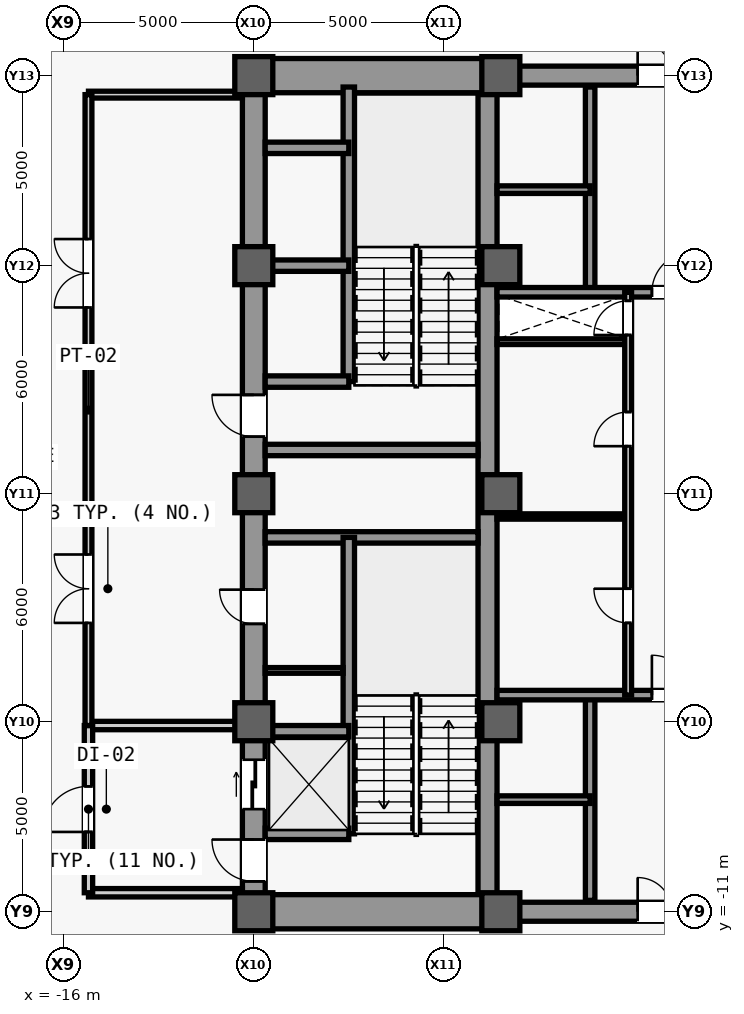
"""IFC4 building model, lengths in metres.
Left out: names, types, materials, properties, quantities, classifications, styles, units other than length and angle.
Written with IfcOpenShell. Run it as: python <this file> out.ifc"""

import sys

from ifc_helpers import new_model, si_unit, direction, frame, frame_2d, origin, origin_2d, place, context, subcontext, project, spatial, rectangle, extrude, source, transform, mapped, element, fill, save


model = new_model("IFC4")
c1 = context("Model", 3, precision=1e-05, world=origin(), true_north=direction((0.0, 1.0)))
c2 = subcontext(c1, "Body", "Model", "MODEL_VIEW")
j1 = project(units=[si_unit("LENGTHUNIT", "METRE"), si_unit("PLANEANGLEUNIT", "RADIAN")], contexts=[c1])
p1 = place(None, origin())
s1 = spatial("IfcSite", under=j1, at=p1, CompositionType="ELEMENT")
p2 = place(p1, origin())
s2 = spatial("IfcBuilding", under=s1, at=p2, CompositionType="ELEMENT")
p3 = place(p2, frame((0.0, 0.0, -4.8)))
s3 = spatial("IfcBuildingStorey", under=s2, at=p3, CompositionType="ELEMENT", Elevation=-4.8)
m1 = source(origin(), c2, "Body", "SweptSolid", [
    extrude(rectangle(XDim=22.0, YDim=0.6, at=frame_2d((11.0, 0.0))), origin(), (0.0, 0.0, 1.0), 4.48),
])
p4 = place(p3, frame((-11.0, -11.0, 0.0), z_axis=(0.0, 0.0, 1.0), x_axis=(0.0, 1.0, 0.0)))
e1 = element("IfcWall", 1, at=p4, inside=s3, PredefinedType="SHEAR", context=c2, shape_type="MappedRepresentation", body=[
    mapped(m1, transform((0.0, 0.0, 0.0), scale=1.0)),
])
m2 = source(origin(), c2, "Body", "SweptSolid", [
    extrude(rectangle(XDim=1.1, YDim=2.2, at=frame_2d((0.55, 1.1))), frame((0.0, 0.31, 0.0), z_axis=(0.0, -1.0, 0.0), x_axis=(1.0, 0.0, 0.0)), (0.0, 0.0, 1.0), 0.62),
])
p5 = place(p4, frame((0.8, 0.0, 0.0)))
e2 = element("IfcOpeningElement", 2, at=p5, cuts=e1, PredefinedType="OPENING", context=c2, shape_type="MappedRepresentation", body=[
    mapped(m2, transform((0.0, 0.0, 0.0), scale=1.0)),
])
p6 = place(p4, frame((12.5, 0.0, 0.0)))
e3 = element("IfcOpeningElement", 3, at=p6, cuts=e1, PredefinedType="OPENING", context=c2, shape_type="MappedRepresentation", body=[
    mapped(m2, transform((0.0, 0.0, 0.0), scale=1.0)),
])
m3 = source(origin(), c2, "Body", "SweptSolid", [
    extrude(rectangle(XDim=0.9, YDim=2.15, at=frame_2d((0.45, 1.075))), frame((0.0, 0.31, 0.0), z_axis=(0.0, -1.0, 0.0), x_axis=(1.0, 0.0, 0.0)), (0.0, 0.0, 1.0), 0.62),
])
p7 = place(p4, frame((7.575, 0.0, 0.0)))
e4 = element("IfcOpeningElement", 4, at=p7, cuts=e1, PredefinedType="OPENING", context=c2, shape_type="MappedRepresentation", body=[
    mapped(m3, transform((0.0, 0.0, 0.0), scale=1.0)),
])
m4 = source(origin(), c2, "Body", "SweptSolid", [
    extrude(rectangle(XDim=1.3, YDim=2.3, at=frame_2d((0.65, 1.15))), frame((0.0, 0.31, 0.0), z_axis=(0.0, -1.0, 0.0), x_axis=(1.0, 0.0, 0.0)), (0.0, 0.0, 1.0), 0.62),
])
p8 = place(p4, frame((2.7, 0.0, 0.0)))
e5 = element("IfcOpeningElement", 5, at=p8, cuts=e1, PredefinedType="OPENING", context=c2, shape_type="MappedRepresentation", body=[
    mapped(m4, transform((0.0, 0.0, 0.0), scale=1.0)),
])
m5 = source(origin(), c2, "Body", "SweptSolid", [
    extrude(rectangle(XDim=21.4, YDim=0.5, at=frame_2d((10.7, 0.0))), origin(), (0.0, 0.0, 1.0), 4.48),
])
p9 = place(p3, frame((-4.85, -10.7, 0.0), z_axis=(0.0, 0.0, 1.0), x_axis=(0.0, 1.0, 0.0)))
e6 = element("IfcWall", 6, at=p9, inside=s3, PredefinedType="SHEAR", context=c2, shape_type="MappedRepresentation", body=[
    mapped(m5, transform((0.0, 0.0, 0.0), scale=1.0)),
])
m6 = source(origin(), c2, "Body", "SweptSolid", [
    extrude(rectangle(XDim=5.85, YDim=0.9, at=frame_2d((2.925, 0.0))), origin(), (0.0, 0.0, 1.0), 4.48),
])
for number, where, z_axis, x_axis in (
    (7, (-10.7, -11.0, 0.0), (0.0, 0.0, 1.0), (1.0, 0.0, 0.0)),
    (8, (-10.7, 11.0, 0.0), (0.0, 0.0, 1.0), (1.0, 0.0, 0.0)),
):
    element("IfcWall", number, at=place(p3, frame(where, z_axis=z_axis, x_axis=x_axis)), inside=s3, PredefinedType="SHEAR", context=c2, shape_type="MappedRepresentation", body=[
        mapped(m6, transform((0.0, 0.0, 0.0), scale=1.0)),
    ])
m7 = source(origin(), c2, "Body", "SweptSolid", [
    extrude(rectangle(XDim=5.6, YDim=0.3, at=frame_2d((2.8, 0.0))), origin(), (0.0, 0.0, 1.0), 4.48),
])
for number, where, z_axis, x_axis in (
    (9, (-10.7, -1.15, 0.0), (0.0, 0.0, 1.0), (1.0, 0.0, 0.0)),
    (10, (-10.7, 1.15, 0.0), (0.0, 0.0, 1.0), (1.0, 0.0, 0.0)),
):
    element("IfcWall", number, at=place(p3, frame(where, z_axis=z_axis, x_axis=x_axis)), inside=s3, PredefinedType="SHEAR", context=c2, shape_type="MappedRepresentation", body=[
        mapped(m7, transform((0.0, 0.0, 0.0), scale=1.0)),
    ])
m8 = source(origin(), c2, "Body", "SweptSolid", [
    extrude(rectangle(XDim=9.2, YDim=0.5, at=frame_2d((4.6, 0.0))), origin(), (0.0, 0.0, 1.0), 4.48),
])
p10 = place(p3, frame((-4.6, -11.0, 0.0), z_axis=(0.0, 0.0, 1.0), x_axis=(1.0, 0.0, 0.0)))
e11 = element("IfcWall", 11, at=p10, inside=s3, PredefinedType="SHEAR", context=c2, shape_type="MappedRepresentation", body=[
    mapped(m8, transform((0.0, 0.0, 0.0), scale=1.0)),
])
m9 = source(origin(), c2, "Body", "SweptSolid", [
    extrude(rectangle(XDim=1.8, YDim=2.25, at=frame_2d((0.9, 1.125))), frame((0.0, 0.26, 0.0), z_axis=(0.0, -1.0, 0.0), x_axis=(1.0, 0.0, 0.0)), (0.0, 0.0, 1.0), 0.52),
])
p11 = place(p10, frame((3.7, 0.0, 0.0)))
e12 = element("IfcOpeningElement", 12, at=p11, cuts=e11, PredefinedType="OPENING", context=c2, shape_type="MappedRepresentation", body=[
    mapped(m9, transform((0.0, 0.0, 0.0), scale=1.0)),
])
p12 = place(p3, frame((-4.6, 11.0, 0.0), z_axis=(0.0, 0.0, 1.0), x_axis=(1.0, 0.0, 0.0)))
e13 = element("IfcWall", 13, at=p12, inside=s3, PredefinedType="SHEAR", context=c2, shape_type="MappedRepresentation", body=[
    mapped(m8, transform((0.0, 0.0, 0.0), scale=1.0)),
])
p13 = place(p12, frame((3.7, 0.0, 0.0)))
e14 = element("IfcOpeningElement", 14, at=p13, cuts=e13, PredefinedType="OPENING", context=c2, shape_type="MappedRepresentation", body=[
    mapped(m9, transform((0.0, 0.0, 0.0), scale=1.0)),
])
m10 = source(origin(), c2, "Body", "SweptSolid", [
    extrude(rectangle(XDim=1.0, YDim=1.0, at=origin_2d()), origin(), (0.0, 0.0, 1.0), 4.8),
])
for number, where, z_axis, x_axis in (
    (15, (-11.0, -11.0, 0.0), (0.0, 0.0, 1.0), (1.0, 0.0, 0.0)),
    (16, (-11.0, -6.0, 0.0), (0.0, 0.0, 1.0), (1.0, 0.0, 0.0)),
    (17, (-11.0, 0.0, 0.0), (0.0, 0.0, 1.0), (1.0, 0.0, 0.0)),
    (18, (-11.0, 6.0, 0.0), (0.0, 0.0, 1.0), (1.0, 0.0, 0.0)),
    (19, (-11.0, 11.0, 0.0), (0.0, 0.0, 1.0), (1.0, 0.0, 0.0)),
    (20, (-4.5, -11.0, 0.0), (0.0, 0.0, 1.0), (1.0, 0.0, 0.0)),
    (21, (-4.5, -6.0, 0.0), (0.0, 0.0, 1.0), (1.0, 0.0, 0.0)),
    (22, (-4.5, 0.0, 0.0), (0.0, 0.0, 1.0), (1.0, 0.0, 0.0)),
    (23, (-4.5, 6.0, 0.0), (0.0, 0.0, 1.0), (1.0, 0.0, 0.0)),
    (24, (-4.5, 11.0, 0.0), (0.0, 0.0, 1.0), (1.0, 0.0, 0.0)),
):
    element("IfcColumn", number, at=place(p3, frame(where, z_axis=z_axis, x_axis=x_axis)), inside=s3, PredefinedType="COLUMN", context=c2, shape_type="MappedRepresentation", body=[
        mapped(m10, transform((0.0, 0.0, 0.0), scale=1.0)),
    ])
m11 = source(origin(), c2, "Body", "SweptSolid", [
    extrude(rectangle(XDim=7.8, YDim=0.3, at=frame_2d((3.9, 0.0))), origin(), (0.0, 0.0, 1.0), 4.48),
])
p14 = place(p3, frame((-8.5, -8.95, 0.0), z_axis=(0.0, 0.0, 1.0), x_axis=(0.0, 1.0, 0.0)))
e25 = element("IfcWall", 25, at=p14, inside=s3, PredefinedType="SHEAR", context=c2, shape_type="MappedRepresentation", body=[
    mapped(m11, transform((0.0, 0.0, 0.0), scale=1.0)),
])
m12 = source(origin(), c2, "Body", "SweptSolid", [
    extrude(rectangle(XDim=2.2, YDim=0.3, at=frame_2d((1.1, 0.0))), origin(), (0.0, 0.0, 1.0), 4.48),
])
for number, where, z_axis, x_axis in (
    (26, (-10.7, -8.95, 0.0), (0.0, 0.0, 1.0), (1.0, 0.0, 0.0)),
    (27, (-10.7, -6.25, 0.0), (0.0, 0.0, 1.0), (1.0, 0.0, 0.0)),
):
    element("IfcWall", number, at=place(p3, frame(where, z_axis=z_axis, x_axis=x_axis)), inside=s3, PredefinedType="SHEAR", context=c2, shape_type="MappedRepresentation", body=[
        mapped(m12, transform((0.0, 0.0, 0.0), scale=1.0)),
    ])
m13 = source(origin(), c2, "Body", "SweptSolid", [
    extrude(rectangle(XDim=7.75, YDim=0.3, at=frame_2d((3.875, 0.0))), origin(), (0.0, 0.0, 1.0), 4.48),
])
p15 = place(p3, frame((-8.5, 2.95, 0.0), z_axis=(0.0, 0.0, 1.0), x_axis=(0.0, 1.0, 0.0)))
e28 = element("IfcWall", 28, at=p15, inside=s3, PredefinedType="SHEAR", context=c2, shape_type="MappedRepresentation", body=[
    mapped(m13, transform((0.0, 0.0, 0.0), scale=1.0)),
])
for number, where, z_axis, x_axis in (
    (29, (-10.7, 2.95, 0.0), (0.0, 0.0, 1.0), (1.0, 0.0, 0.0)),
    (30, (-10.7, 6.0, 0.0), (0.0, 0.0, 1.0), (1.0, 0.0, 0.0)),
    (31, (-10.7, 9.1, 0.0), (0.0, 0.0, 1.0), (1.0, 0.0, 0.0)),
):
    element("IfcWall", number, at=place(p3, frame(where, z_axis=z_axis, x_axis=x_axis)), inside=s3, PredefinedType="SHEAR", context=c2, shape_type="MappedRepresentation", body=[
        mapped(m12, transform((0.0, 0.0, 0.0), scale=1.0)),
    ])
m14 = source(origin(), c2, "Body", "SweptSolid", [
    extrude(rectangle(XDim=2.05, YDim=0.15, at=frame_2d((1.025, 0.0))), origin(), (0.0, 0.0, 1.0), 4.48),
])
p16 = place(p3, frame((-10.7, -4.65, 0.0), z_axis=(0.0, 0.0, 1.0), x_axis=(1.0, 0.0, 0.0)))
e32 = element("IfcWall", 32, at=p16, inside=s3, PredefinedType="PARTITIONING", context=c2, shape_type="MappedRepresentation", body=[
    mapped(m14, transform((0.0, 0.0, 0.0), scale=1.0)),
])
m15 = source(origin(), c2, "Body", "SweptSolid", [
    extrude(rectangle(XDim=4.05, YDim=0.22, at=frame_2d((2.025, 0.0))), origin(), (0.0, 0.0, 1.0), 4.48),
])
for number, where, z_axis, x_axis in (
    (33, (-15.35, -10.5, 0.0), (0.0, 0.0, 1.0), (1.0, 0.0, 0.0)),
    (34, (-15.35, -6.1, 0.0), (0.0, 0.0, 1.0), (1.0, 0.0, 0.0)),
):
    element("IfcWall", number, at=place(p3, frame(where, z_axis=z_axis, x_axis=x_axis)), inside=s3, PredefinedType="PARTITIONING", context=c2, shape_type="MappedRepresentation", body=[
        mapped(m15, transform((0.0, 0.0, 0.0), scale=1.0)),
    ])
m16 = source(origin(), c2, "Body", "SweptSolid", [
    extrude(rectangle(XDim=4.4, YDim=0.22, at=frame_2d((2.2, 0.0))), origin(), (0.0, 0.0, 1.0), 4.48),
])
p17 = place(p3, frame((-15.35, -10.5, 0.0), z_axis=(0.0, 0.0, 1.0), x_axis=(0.0, 1.0, 0.0)))
e35 = element("IfcWall", 35, at=p17, inside=s3, PredefinedType="PARTITIONING", context=c2, shape_type="MappedRepresentation", body=[
    mapped(m16, transform((0.0, 0.0, 0.0), scale=1.0)),
])
m17 = source(origin(), c2, "Body", "SweptSolid", [
    extrude(rectangle(XDim=1.2, YDim=2.2, at=frame_2d((0.6, 1.1))), frame((0.0, 0.12, 0.0), z_axis=(0.0, -1.0, 0.0), x_axis=(1.0, 0.0, 0.0)), (0.0, 0.0, 1.0), 0.24),
])
p18 = place(p17, frame((1.6, 0.0, 0.0)))
e36 = element("IfcOpeningElement", 36, at=p18, cuts=e35, PredefinedType="OPENING", context=c2, shape_type="MappedRepresentation", body=[
    mapped(m17, transform((0.0, 0.0, 0.0), scale=1.0)),
])
m18 = source(origin(), c2, "Body", "SweptSolid", [
    extrude(rectangle(XDim=4.05, YDim=0.18, at=frame_2d((2.025, 0.0))), origin(), (0.0, 0.0, 1.0), 4.48),
])
p19 = place(p3, frame((-15.35, 10.5, 0.0), z_axis=(0.0, 0.0, 1.0), x_axis=(1.0, 0.0, 0.0)))
e37 = element("IfcWall", 37, at=p19, inside=s3, PredefinedType="PARTITIONING", context=c2, shape_type="MappedRepresentation", body=[
    mapped(m18, transform((0.0, 0.0, 0.0), scale=1.0)),
])
m19 = source(origin(), c2, "Body", "SweptSolid", [
    extrude(rectangle(XDim=16.6, YDim=0.18, at=frame_2d((8.3, 0.0))), origin(), (0.0, 0.0, 1.0), 4.48),
])
p20 = place(p3, frame((-15.35, -6.1, 0.0), z_axis=(0.0, 0.0, 1.0), x_axis=(0.0, 1.0, 0.0)))
e38 = element("IfcWall", 38, at=p20, inside=s3, PredefinedType="PARTITIONING", context=c2, shape_type="MappedRepresentation", body=[
    mapped(m19, transform((0.0, 0.0, 0.0), scale=1.0)),
])
m20 = source(origin(), c2, "Body", "SweptSolid", [
    extrude(rectangle(XDim=1.8, YDim=2.25, at=frame_2d((0.9, 1.125))), frame((0.0, 0.1, 0.0), z_axis=(0.0, -1.0, 0.0), x_axis=(1.0, 0.0, 0.0)), (0.0, 0.0, 1.0), 0.2),
])
p21 = place(p20, frame((2.7, 0.0, 0.0)))
e39 = element("IfcOpeningElement", 39, at=p21, cuts=e38, PredefinedType="OPENING", context=c2, shape_type="MappedRepresentation", body=[
    mapped(m20, transform((0.0, 0.0, 0.0), scale=1.0)),
])
p22 = place(p20, frame((11.0, 0.0, 0.0)))
e40 = element("IfcOpeningElement", 40, at=p22, cuts=e38, PredefinedType="OPENING", context=c2, shape_type="MappedRepresentation", body=[
    mapped(m20, transform((0.0, 0.0, 0.0), scale=1.0)),
])
m21 = source(origin(), c2, "Body", "SweptSolid", [
    extrude(rectangle(XDim=3.45, YDim=0.15, at=frame_2d((1.725, 0.0))), origin(), (0.0, 0.0, 1.0), 4.48),
])
p23 = place(p3, frame((-4.6, 4.0, 0.0), z_axis=(0.0, 0.0, 1.0), x_axis=(1.0, 0.0, 0.0)))
e41 = element("IfcWall", 41, at=p23, inside=s3, PredefinedType="PARTITIONING", context=c2, shape_type="MappedRepresentation", body=[
    mapped(m21, transform((0.0, 0.0, 0.0), scale=1.0)),
])
m22 = source(origin(), c2, "Body", "SweptSolid", [
    extrude(rectangle(XDim=5.4, YDim=0.25, at=frame_2d((2.7, 0.0))), origin(), (0.0, 0.0, 1.0), 4.48),
])
p24 = place(p3, frame((-2.15, -10.7, 0.0), z_axis=(0.0, 0.0, 1.0), x_axis=(0.0, 1.0, 0.0)))
e42 = element("IfcWall", 42, at=p24, inside=s3, PredefinedType="SHEAR", context=c2, shape_type="MappedRepresentation", body=[
    mapped(m22, transform((0.0, 0.0, 0.0), scale=1.0)),
])
m23 = source(origin(), c2, "Body", "SweptSolid", [
    extrude(rectangle(XDim=2.45, YDim=0.2, at=frame_2d((1.225, 0.0))), origin(), (0.0, 0.0, 1.0), 4.48),
])
p25 = place(p3, frame((-4.6, -8.05, 0.0), z_axis=(0.0, 0.0, 1.0), x_axis=(1.0, 0.0, 0.0)))
e43 = element("IfcWall", 43, at=p25, inside=s3, PredefinedType="SHEAR", context=c2, shape_type="MappedRepresentation", body=[
    mapped(m23, transform((0.0, 0.0, 0.0), scale=1.0)),
])
m24 = source(origin(), c2, "Body", "SweptSolid", [
    extrude(rectangle(XDim=9.2, YDim=0.25, at=frame_2d((4.6, 0.0))), origin(), (0.0, 0.0, 1.0), 4.48),
])
p26 = place(p3, frame((-4.6, -5.3, 0.0), z_axis=(0.0, 0.0, 1.0), x_axis=(1.0, 0.0, 0.0)))
e44 = element("IfcWall", 44, at=p26, inside=s3, PredefinedType="SHEAR", context=c2, shape_type="MappedRepresentation", body=[
    mapped(m24, transform((0.0, 0.0, 0.0), scale=1.0)),
])
m25 = source(origin(), c2, "Body", "SweptSolid", [
    extrude(rectangle(XDim=1.05, YDim=2.2, at=frame_2d((0.525, 1.1))), frame((0.0, 0.135, 0.0), z_axis=(0.0, -1.0, 0.0), x_axis=(1.0, 0.0, 0.0)), (0.0, 0.0, 1.0), 0.27),
])
p27 = place(p26, frame((4.075, 0.0, 0.0)))
e45 = element("IfcOpeningElement", 45, at=p27, cuts=e44, PredefinedType="OPENING", context=c2, shape_type="MappedRepresentation", body=[
    mapped(m25, transform((0.0, 0.0, 0.0), scale=1.0)),
])
p28 = place(p3, frame((-2.15, 5.3, 0.0), z_axis=(0.0, 0.0, 1.0), x_axis=(0.0, 1.0, 0.0)))
e46 = element("IfcWall", 46, at=p28, inside=s3, PredefinedType="SHEAR", context=c2, shape_type="MappedRepresentation", body=[
    mapped(m22, transform((0.0, 0.0, 0.0), scale=1.0)),
])
p29 = place(p3, frame((-4.6, 8.0, 0.0), z_axis=(0.0, 0.0, 1.0), x_axis=(1.0, 0.0, 0.0)))
e47 = element("IfcWall", 47, at=p29, inside=s3, PredefinedType="SHEAR", context=c2, shape_type="MappedRepresentation", body=[
    mapped(m23, transform((0.0, 0.0, 0.0), scale=1.0)),
])
p30 = place(p3, frame((-4.6, 5.3, 0.0), z_axis=(0.0, 0.0, 1.0), x_axis=(1.0, 0.0, 0.0)))
e48 = element("IfcWall", 48, at=p30, inside=s3, PredefinedType="SHEAR", context=c2, shape_type="MappedRepresentation", body=[
    mapped(m24, transform((0.0, 0.0, 0.0), scale=1.0)),
])
p31 = place(p30, frame((4.075, 0.0, 0.0)))
e49 = element("IfcOpeningElement", 49, at=p31, cuts=e48, PredefinedType="OPENING", context=c2, shape_type="MappedRepresentation", body=[
    mapped(m25, transform((0.0, 0.0, 0.0), scale=1.0)),
])
m26 = source(origin(), c2, "Body", "SweptSolid", [
    extrude(rectangle(XDim=3.45, YDim=0.14, at=frame_2d((1.725, 0.0))), origin(), (0.0, 0.0, 1.0), 4.48),
])
p32 = place(p3, frame((-4.6, -0.6, 0.0), z_axis=(0.0, 0.0, 1.0), x_axis=(1.0, 0.0, 0.0)))
e50 = element("IfcWall", 50, at=p32, inside=s3, PredefinedType="PARTITIONING", context=c2, shape_type="MappedRepresentation", body=[
    mapped(m26, transform((0.0, 0.0, 0.0), scale=1.0)),
])
m27 = source(origin(), c2, "Body", "SweptSolid", [
    extrude(rectangle(XDim=10.6, YDim=0.18, at=frame_2d((5.3, 0.0))), origin(), (0.0, 0.0, 1.0), 4.48),
])
p33 = place(p3, frame((-1.15, -5.3, 0.0), z_axis=(0.0, 0.0, 1.0), x_axis=(0.0, 1.0, 0.0)))
e51 = element("IfcWall", 51, at=p33, inside=s3, PredefinedType="PARTITIONING", context=c2, shape_type="MappedRepresentation", body=[
    mapped(m27, transform((0.0, 0.0, 0.0), scale=1.0)),
])
m28 = source(origin(), c2, "Body", "SweptSolid", [
    extrude(rectangle(XDim=0.9, YDim=2.15, at=frame_2d((0.45, 1.075))), frame((0.0, 0.1, 0.0), z_axis=(0.0, -1.0, 0.0), x_axis=(1.0, 0.0, 0.0)), (0.0, 0.0, 1.0), 0.2),
])
p34 = place(p33, frame((1.9, 0.0, 0.0)))
e52 = element("IfcOpeningElement", 52, at=p34, cuts=e51, PredefinedType="OPENING", context=c2, shape_type="MappedRepresentation", body=[
    mapped(m28, transform((0.0, 0.0, 0.0), scale=1.0)),
])
p35 = place(p33, frame((6.55, 0.0, 0.0)))
e53 = element("IfcOpeningElement", 53, at=p35, cuts=e51, PredefinedType="OPENING", context=c2, shape_type="MappedRepresentation", body=[
    mapped(m28, transform((0.0, 0.0, 0.0), scale=1.0)),
])
p36 = place(p33, frame((9.475, 0.0, 0.0)))
e54 = element("IfcOpeningElement", 54, at=p36, cuts=e51, PredefinedType="OPENING", context=c2, shape_type="MappedRepresentation", body=[
    mapped(m28, transform((0.0, 0.0, 0.0), scale=1.0)),
])
m29 = source(origin(), c2, "Body", "SweptSolid", [
    extrude(rectangle(XDim=1.1, YDim=2.2, at=frame_2d((0.55, 1.1))), frame((0.0, 0.025, 0.0), z_axis=(0.0, -1.0, 0.0), x_axis=(1.0, 0.0, 0.0)), (0.0, 0.0, 1.0), 0.05),
])
p37 = place(p5, origin())
e55 = element("IfcDoor", 55, at=p37, inside=s3, OperationType="SINGLE_SWING_RIGHT", PredefinedType="DOOR", context=c2, shape_type="MappedRepresentation", body=[
    mapped(m29, transform((0.0, 0.0, 0.0), scale=1.0)),
])
fill(e2, e55)
p38 = place(p6, origin())
e56 = element("IfcDoor", 56, at=p38, inside=s3, OperationType="SINGLE_SWING_RIGHT", PredefinedType="DOOR", context=c2, shape_type="MappedRepresentation", body=[
    mapped(m29, transform((0.0, 0.0, 0.0), scale=1.0)),
])
fill(e3, e56)
m30 = source(origin(), c2, "Body", "SweptSolid", [
    extrude(rectangle(XDim=0.9, YDim=2.15, at=frame_2d((0.45, 1.075))), frame((0.0, 0.025, 0.0), z_axis=(0.0, -1.0, 0.0), x_axis=(1.0, 0.0, 0.0)), (0.0, 0.0, 1.0), 0.05),
])
p39 = place(p7, origin())
e57 = element("IfcDoor", 57, at=p39, inside=s3, OperationType="SINGLE_SWING_RIGHT", PredefinedType="DOOR", context=c2, shape_type="MappedRepresentation", body=[
    mapped(m30, transform((0.0, 0.0, 0.0), scale=1.0)),
])
fill(e4, e57)
m31 = source(origin(), c2, "Body", "SweptSolid", [
    extrude(rectangle(XDim=1.2, YDim=2.2, at=frame_2d((0.6, 1.1))), frame((0.0, 0.025, 0.0), z_axis=(0.0, -1.0, 0.0), x_axis=(1.0, 0.0, 0.0)), (0.0, 0.0, 1.0), 0.05),
])
p40 = place(p18, origin())
e58 = element("IfcDoor", 58, at=p40, inside=s3, OperationType="SINGLE_SWING_LEFT", PredefinedType="DOOR", context=c2, shape_type="MappedRepresentation", body=[
    mapped(m31, transform((0.0, 0.0, 0.0), scale=1.0)),
])
fill(e36, e58)
m32 = source(origin(), c2, "Body", "SweptSolid", [
    extrude(rectangle(XDim=1.8, YDim=2.25, at=frame_2d((0.9, 1.125))), frame((0.0, 0.025, 0.0), z_axis=(0.0, -1.0, 0.0), x_axis=(1.0, 0.0, 0.0)), (0.0, 0.0, 1.0), 0.05),
])
p41 = place(p21, origin())
e59 = element("IfcDoor", 59, at=p41, inside=s3, OperationType="SINGLE_SWING_LEFT", PredefinedType="DOOR", context=c2, shape_type="MappedRepresentation", body=[
    mapped(m32, transform((0.0, 0.0, 0.0), scale=1.0)),
])
fill(e39, e59)
p42 = place(p22, origin())
e60 = element("IfcDoor", 60, at=p42, inside=s3, OperationType="SINGLE_SWING_RIGHT", PredefinedType="DOOR", context=c2, shape_type="MappedRepresentation", body=[
    mapped(m32, transform((0.0, 0.0, 0.0), scale=1.0)),
])
fill(e40, e60)
m33 = source(origin(), c2, "Body", "SweptSolid", [
    extrude(rectangle(XDim=1.05, YDim=2.2, at=frame_2d((0.525, 1.1))), frame((0.0, 0.025, 0.0), z_axis=(0.0, -1.0, 0.0), x_axis=(1.0, 0.0, 0.0)), (0.0, 0.0, 1.0), 0.05),
])
p43 = place(p27, origin())
e61 = element("IfcDoor", 61, at=p43, inside=s3, OperationType="SINGLE_SWING_LEFT", PredefinedType="DOOR", context=c2, shape_type="MappedRepresentation", body=[
    mapped(m33, transform((0.0, 0.0, 0.0), scale=1.0)),
])
fill(e45, e61)
p44 = place(p11, origin())
e62 = element("IfcDoor", 62, at=p44, inside=s3, OperationType="SINGLE_SWING_LEFT", PredefinedType="DOOR", context=c2, shape_type="MappedRepresentation", body=[
    mapped(m32, transform((0.0, 0.0, 0.0), scale=1.0)),
])
fill(e12, e62)
p45 = place(p31, origin())
e63 = element("IfcDoor", 63, at=p45, inside=s3, OperationType="SINGLE_SWING_RIGHT", PredefinedType="DOOR", context=c2, shape_type="MappedRepresentation", body=[
    mapped(m33, transform((0.0, 0.0, 0.0), scale=1.0)),
])
fill(e49, e63)
p46 = place(p13, origin())
e64 = element("IfcDoor", 64, at=p46, inside=s3, OperationType="SINGLE_SWING_RIGHT", PredefinedType="DOOR", context=c2, shape_type="MappedRepresentation", body=[
    mapped(m32, transform((0.0, 0.0, 0.0), scale=1.0)),
])
fill(e14, e64)
p47 = place(p34, origin())
e65 = element("IfcDoor", 65, at=p47, inside=s3, OperationType="SINGLE_SWING_RIGHT", PredefinedType="DOOR", context=c2, shape_type="MappedRepresentation", body=[
    mapped(m30, transform((0.0, 0.0, 0.0), scale=1.0)),
])
fill(e52, e65)
p48 = place(p35, origin())
e66 = element("IfcDoor", 66, at=p48, inside=s3, OperationType="SINGLE_SWING_LEFT", PredefinedType="DOOR", context=c2, shape_type="MappedRepresentation", body=[
    mapped(m30, transform((0.0, 0.0, 0.0), scale=1.0)),
])
fill(e53, e66)
p49 = place(p36, origin())
e67 = element("IfcDoor", 67, at=p49, inside=s3, OperationType="SINGLE_SWING_LEFT", PredefinedType="DOOR", context=c2, shape_type="MappedRepresentation", body=[
    mapped(m30, transform((0.0, 0.0, 0.0), scale=1.0)),
])
fill(e54, e67)
m34 = source(origin(), c2, "Body", "SweptSolid", [
    extrude(rectangle(XDim=1.3, YDim=2.3, at=frame_2d((0.65, 1.15))), frame((0.0, 0.025, 0.0), z_axis=(0.0, -1.0, 0.0), x_axis=(1.0, 0.0, 0.0)), (0.0, 0.0, 1.0), 0.05),
])
p50 = place(p8, origin())
e68 = element("IfcDoor", 68, at=p50, inside=s3, OperationType="SLIDING_TO_LEFT", PredefinedType="DOOR", context=c2, shape_type="MappedRepresentation", body=[
    mapped(m34, transform((0.0, 0.0, 0.0), scale=1.0)),
])
fill(e5, e68)
save(model, sys.argv[1])
